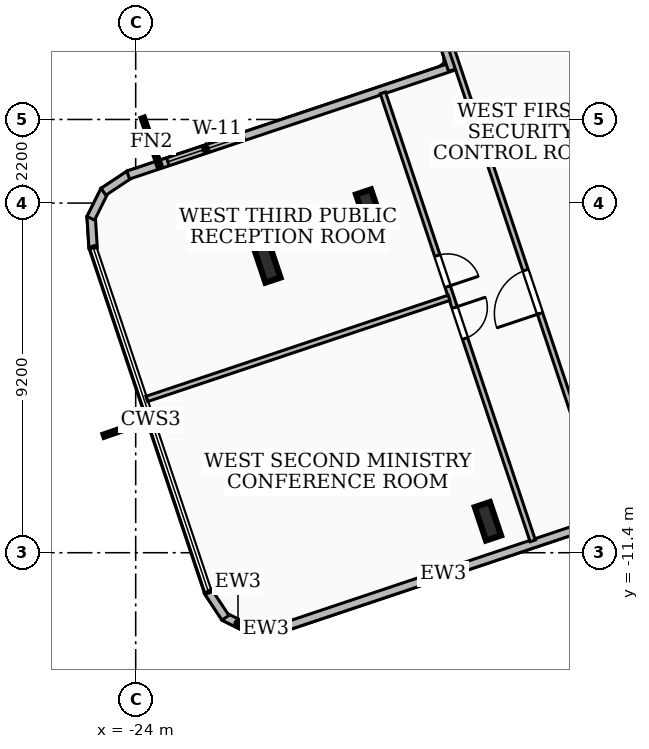
"""IFC4 building model, lengths in metres.
Left out: names, types, materials, properties, quantities, classifications, styles, units other than length and angle.
Written with IfcOpenShell. Run it as: python <this file> out.ifc"""

import sys

from ifc_helpers import new_model, si_unit, direction, frame, frame_2d, origin, origin_2d, place, context, subcontext, project, spatial, rectangle, i_section, extrude, element, fill, save


model = new_model("IFC4")
c1 = context("Model", 3, precision=1e-05, world=origin(), true_north=direction((0.0, 1.0)))
c2 = subcontext(c1, "Body", "Model", "MODEL_VIEW")
j1 = project(units=[si_unit("LENGTHUNIT", "METRE"), si_unit("PLANEANGLEUNIT", "RADIAN")], contexts=[c1])
p1 = place(None, origin())
s1 = spatial("IfcSite", under=j1, at=p1, CompositionType="ELEMENT")
p2 = place(p1, origin())
s2 = spatial("IfcBuilding", under=s1, at=p2, CompositionType="ELEMENT")
p3 = place(p2, frame((0.0, 0.0, 163.08)))
s3 = spatial("IfcBuildingStorey", under=s2, at=p3, CompositionType="ELEMENT", Elevation=163.08)
for number, where, z_axis, x_axis in (
    (1, (-17.858, -2.346, 0.0), (0.0, 0.0, 1.0), (0.948, 0.317, 0.0)),
    (2, (-20.535, -3.788, 0.0), (0.0, 0.0, 1.0), (0.948, 0.317, 0.0)),
    (3, (-14.731, -10.573, 0.0), (0.0, 0.0, 1.0), (0.948, 0.317, 0.0)),
):
    element("IfcColumn", number, at=place(p3, frame(where, z_axis=z_axis, x_axis=x_axis)), inside=s3, PredefinedType="COLUMN", context=c2, shape_type="SweptSolid", body=[
        extrude(i_section(OverallWidth=0.418, OverallDepth=0.927, WebThickness=0.019, FlangeThickness=0.032, at=origin_2d()), origin(), (0.0, 0.0, 1.0), 3.6),
    ])
p4 = place(p3, frame((-11.615, -10.519, 0.0), z_axis=(0.0, 0.0, 1.0), x_axis=(-0.948329626758, -0.317286808759, 0.0)))
e4 = element("IfcWall", 4, at=p4, inside=s3, PredefinedType="SOLIDWALL", context=c2, shape_type="SweptSolid", body=[
    extrude(rectangle(XDim=9.058, YDim=0.22, at=frame_2d((4.529, 0.0))), origin(), (0.0, 0.0, 1.0), 2.72),
])
p5 = place(p3, frame((-20.156, -13.383, 0.0), z_axis=(0.0, 0.0, 1.0), x_axis=(-0.998057128569, -0.062305442082, 0.0)))
e5 = element("IfcWall", 5, at=p5, inside=s3, PredefinedType="SOLIDWALL", context=c2, shape_type="SweptSolid", body=[
    extrude(rectangle(XDim=0.835, YDim=0.22, at=frame_2d((0.417, 0.0))), origin(), (0.0, 0.0, 1.0), 3.34),
])
p6 = place(p3, frame((-20.942, -13.444, 0.0), z_axis=(0.0, 0.0, 1.0), x_axis=(-0.894963703084, 0.446138958356, 0.0)))
e6 = element("IfcWall", 6, at=p6, inside=s3, PredefinedType="SOLIDWALL", context=c2, shape_type="SweptSolid", body=[
    extrude(rectangle(XDim=0.818, YDim=0.22, at=frame_2d((0.409, 0.0))), origin(), (0.0, 0.0, 1.0), 3.34),
])
p7 = place(p3, frame((-21.638, -13.111, 0.0), z_axis=(0.0, 0.0, 1.0), x_axis=(-0.552336300706, 0.833621383437, 0.0)))
e7 = element("IfcWall", 7, at=p7, inside=s3, PredefinedType="SOLIDWALL", context=c2, shape_type="SweptSolid", body=[
    extrude(rectangle(XDim=0.835, YDim=0.22, at=frame_2d((0.417, 0.0))), origin(), (0.0, 0.0, 1.0), 3.34),
])
p8 = place(p3, frame((-25.12, -3.384, 0.0), z_axis=(0.0, 0.0, 1.0), x_axis=(-0.062378286155, 0.998052578483, 0.0)))
e8 = element("IfcWall", 8, at=p8, inside=s3, PredefinedType="SOLIDWALL", context=c2, shape_type="SweptSolid", body=[
    extrude(rectangle(XDim=0.834, YDim=0.22, at=frame_2d((0.417, 0.0))), origin(), (0.0, 0.0, 1.0), 3.34),
])
p9 = place(p3, frame((-25.181, -2.599, 0.0), z_axis=(0.0, 0.0, 1.0), x_axis=(0.445662792415, 0.895200913459, 0.0)))
e9 = element("IfcWall", 9, at=p9, inside=s3, PredefinedType="SOLIDWALL", context=c2, shape_type="SweptSolid", body=[
    extrude(rectangle(XDim=0.819, YDim=0.22, at=frame_2d((0.41, 0.0))), origin(), (0.0, 0.0, 1.0), 3.34),
])
p10 = place(p3, frame((-24.848, -1.902, 0.0), z_axis=(0.0, 0.0, 1.0), x_axis=(0.833532147948, 0.552470957008, 0.0)))
e10 = element("IfcWall", 10, at=p10, inside=s3, PredefinedType="SOLIDWALL", context=c2, shape_type="SweptSolid", body=[
    extrude(rectangle(XDim=0.835, YDim=0.22, at=frame_2d((0.417, 0.0))), origin(), (0.0, 0.0, 1.0), 3.34),
])
p11 = place(p3, frame((-24.197, -1.463, 0.0), z_axis=(0.0, 0.0, 1.0), x_axis=(0.948337736373, 0.31726256913, 0.0)))
e11 = element("IfcWall", 11, at=p11, inside=s3, PredefinedType="SOLIDWALL", context=c2, shape_type="SweptSolid", body=[
    extrude(rectangle(XDim=9.058, YDim=0.22, at=frame_2d((4.529, 0.0))), origin(), (0.0, 0.0, 1.0), 3.34),
])
p12 = place(p11, frame((1.1, 0.0, 0.85)))
e12 = element("IfcOpeningElement", 12, at=p12, cuts=e11, PredefinedType="OPENING", context=c2, shape_type="SweptSolid", body=[
    extrude(rectangle(XDim=2.1, YDim=1.6, at=frame_2d((1.05, 0.8))), frame((0.0, 0.12, 0.0), z_axis=(0.0, -1.0, 0.0), x_axis=(1.0, 0.0, 0.0)), (0.0, 0.0, 1.0), 0.24),
])
p13 = place(p3, frame((-15.662, 1.3, 0.0), z_axis=(0.0, 0.0, 1.0), x_axis=(-0.317224676093, 0.948350412494, 0.0)))
e13 = element("IfcWall", 13, at=p13, inside=s3, PredefinedType="SOLIDWALL", context=c2, shape_type="SweptSolid", body=[
    extrude(rectangle(XDim=6.758, YDim=0.22, at=frame_2d((3.379, 0.0))), origin(), (0.0, 0.0, 1.0), 3.34),
])
p14 = place(p3, frame((-10.372, -14.037, 0.0), z_axis=(0.0, 0.0, 1.0), x_axis=(-0.317298382655, 0.94832575435, 0.0)))
e14 = element("IfcWall", 14, at=p14, inside=s3, PredefinedType="PARTITIONING", context=c2, shape_type="SweptSolid", body=[
    extrude(rectangle(XDim=20.041, YDim=0.145, at=frame_2d((10.021, 0.0))), origin(), (0.0, 0.0, 1.0), 2.644),
])
p15 = place(p14, frame((9.42, 0.0, 0.0)))
e15 = element("IfcOpeningElement", 15, at=p15, cuts=e14, PredefinedType="OPENING", context=c2, shape_type="SweptSolid", body=[
    extrude(rectangle(XDim=1.2, YDim=2.1, at=frame_2d((0.6, 1.05))), frame((0.0, 0.083, 0.0), z_axis=(0.0, -1.0, 0.0), x_axis=(1.0, 0.0, 0.0)), (0.0, 0.0, 1.0), 0.165),
])
p16 = place(p3, frame((-15.755, -4.692, 0.0), z_axis=(0.0, 0.0, 1.0), x_axis=(-0.948309976651, -0.31734553437, 0.0)))
e16 = element("IfcWall", 16, at=p16, inside=s3, PredefinedType="PARTITIONING", context=c2, shape_type="SweptSolid", body=[
    extrude(rectangle(XDim=8.385, YDim=0.145, at=frame_2d((4.193, 0.0))), origin(), (0.0, 0.0, 1.0), 2.793),
])
p17 = place(p3, frame((-17.496, 0.7, 0.0), z_axis=(0.0, 0.0, 1.0), x_axis=(0.317299961245, -0.948325226172, 0.0)))
e17 = element("IfcWall", 17, at=p17, inside=s3, PredefinedType="PARTITIONING", context=c2, shape_type="SweptSolid", body=[
    extrude(rectangle(XDim=12.43, YDim=0.145, at=frame_2d((6.215, 0.0))), origin(), (0.0, 0.0, 1.0), 2.644),
])
p18 = place(p17, frame((4.515, 0.0, 0.0)))
e18 = element("IfcOpeningElement", 18, at=p18, cuts=e17, PredefinedType="OPENING", context=c2, shape_type="SweptSolid", body=[
    extrude(rectangle(XDim=0.86, YDim=2.04, at=frame_2d((0.43, 1.02))), frame((0.0, 0.083, 0.0), z_axis=(0.0, -1.0, 0.0), x_axis=(1.0, 0.0, 0.0)), (0.0, 0.0, 1.0), 0.165),
])
p19 = place(p17, frame((5.955, 0.0, 0.0)))
e19 = element("IfcOpeningElement", 19, at=p19, cuts=e17, PredefinedType="OPENING", context=c2, shape_type="SweptSolid", body=[
    extrude(rectangle(XDim=0.86, YDim=2.04, at=frame_2d((0.43, 1.02))), frame((0.0, 0.083, 0.0), z_axis=(0.0, -1.0, 0.0), x_axis=(1.0, 0.0, 0.0)), (0.0, 0.0, 1.0), 0.165),
])
p20 = place(p12, origin())
e20 = element("IfcWindow", 20, at=p20, inside=s3, PartitioningType="SINGLE_PANEL", PredefinedType="WINDOW", context=c2, shape_type="SweptSolid", body=[
    extrude(rectangle(XDim=2.1, YDim=1.6, at=frame_2d((1.05, 0.8))), frame((0.0, 0.03, 0.0), z_axis=(0.0, -1.0, 0.0), x_axis=(1.0, 0.0, 0.0)), (0.0, 0.0, 1.0), 0.06),
])
fill(e12, e20)
p21 = place(p15, origin())
e21 = element("IfcDoor", 21, at=p21, inside=s3, OperationType="SINGLE_SWING_LEFT", PredefinedType="DOOR", context=c2, shape_type="SweptSolid", body=[
    extrude(rectangle(XDim=1.2, YDim=2.1, at=frame_2d((0.6, 1.05))), frame((0.0, 0.025, 0.0), z_axis=(0.0, -1.0, 0.0), x_axis=(1.0, 0.0, 0.0)), (0.0, 0.0, 1.0), 0.05),
])
fill(e15, e21)
p22 = place(p18, origin())
e22 = element("IfcDoor", 22, at=p22, inside=s3, OperationType="SINGLE_SWING_RIGHT", PredefinedType="DOOR", context=c2, shape_type="SweptSolid", body=[
    extrude(rectangle(XDim=0.86, YDim=2.04, at=frame_2d((0.43, 1.02))), frame((0.0, 0.025, 0.0), z_axis=(0.0, -1.0, 0.0), x_axis=(1.0, 0.0, 0.0)), (0.0, 0.0, 1.0), 0.05),
])
fill(e18, e22)
p23 = place(p19, origin())
e23 = element("IfcDoor", 23, at=p23, inside=s3, OperationType="SINGLE_SWING_LEFT", PredefinedType="DOOR", context=c2, shape_type="SweptSolid", body=[
    extrude(rectangle(XDim=0.86, YDim=2.04, at=frame_2d((0.43, 1.02))), frame((0.0, 0.025, 0.0), z_axis=(0.0, -1.0, 0.0), x_axis=(1.0, 0.0, 0.0)), (0.0, 0.0, 1.0), 0.05),
])
fill(e19, e23)
save(model, sys.argv[1])
